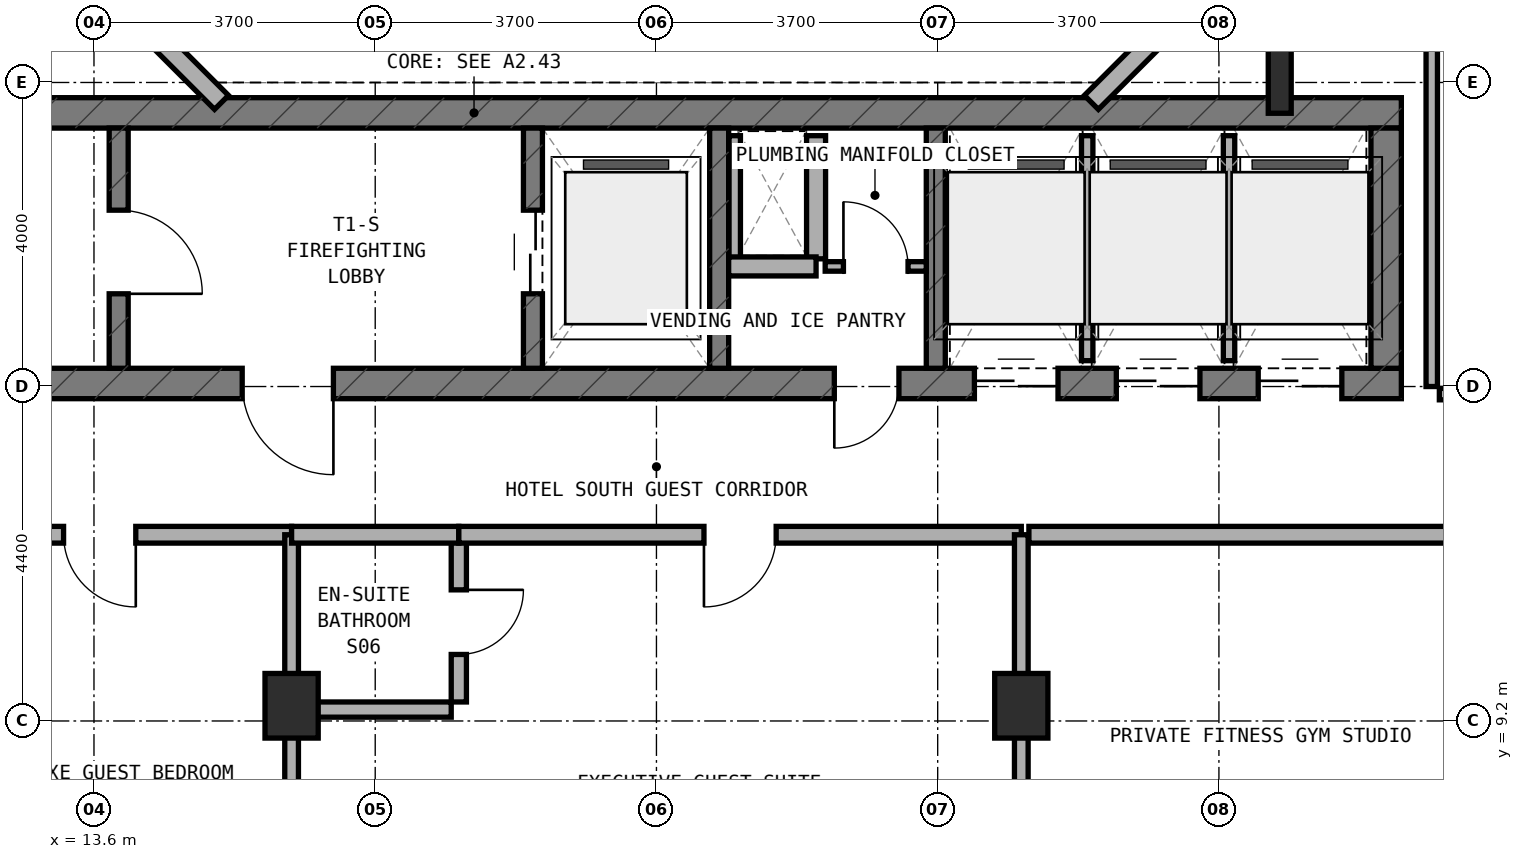
"""IFC4 building model, lengths in metres.
Left out: names, types, materials, properties, quantities, classifications, styles, units other than length and angle.
Written with IfcOpenShell. Run it as: python <this file> out.ifc"""

import sys

from ifc_helpers import new_model, si_unit, direction, frame, frame_2d, origin, origin_2d, place, context, subcontext, project, spatial, rectangle, i_section, extrude, element, fill, save


model = new_model("IFC4")
c1 = context("Model", 3, precision=1e-05, world=origin(), true_north=direction((0.0, 1.0)))
c2 = subcontext(c1, "Body", "Model", "MODEL_VIEW")
j1 = project(units=[si_unit("LENGTHUNIT", "METRE"), si_unit("PLANEANGLEUNIT", "RADIAN")], contexts=[c1])
p1 = place(None, origin())
s1 = spatial("IfcSite", under=j1, at=p1, CompositionType="ELEMENT")
p2 = place(p1, origin())
s2 = spatial("IfcBuilding", under=s1, at=p2, CompositionType="ELEMENT")
p3 = place(p2, frame((0.0, 0.0, 199.1)))
s3 = spatial("IfcBuildingStorey", under=s2, at=p3, CompositionType="ELEMENT", Elevation=199.1)
p4 = place(p3, frame((6.4, 13.64, 0.0), z_axis=(0.0, 0.0, 1.0), x_axis=(1.0, 0.0, 0.0)))
e1 = element("IfcWall", 1, at=p4, inside=s3, PredefinedType="SHEAR", context=c2, shape_type="SweptSolid", body=[
    extrude(rectangle(XDim=24.4, YDim=0.4, at=frame_2d((12.2, 0.0))), origin(), (0.0, 0.0, 1.0), 3.6),
])
p5 = place(p4, frame((9.15, 0.0, 0.0)))
e2 = element("IfcOpeningElement", 2, at=p5, cuts=e1, PredefinedType="OPENING", context=c2, shape_type="SweptSolid", body=[
    extrude(rectangle(XDim=1.2, YDim=2.15, at=frame_2d((0.6, 1.075))), frame((0.0, 0.21, 0.0), z_axis=(0.0, -1.0, 0.0), x_axis=(1.0, 0.0, 0.0)), (0.0, 0.0, 1.0), 0.42),
])
p6 = place(p4, frame((16.94, 0.0, 0.0)))
e3 = element("IfcOpeningElement", 3, at=p6, cuts=e1, PredefinedType="OPENING", context=c2, shape_type="SweptSolid", body=[
    extrude(rectangle(XDim=0.85, YDim=2.1, at=frame_2d((0.425, 1.05))), frame((0.0, 0.21, 0.0), z_axis=(0.0, -1.0, 0.0), x_axis=(1.0, 0.0, 0.0)), (0.0, 0.0, 1.0), 0.42),
])
p7 = place(p4, frame((18.783, 0.0, 0.0)))
e4 = element("IfcOpeningElement", 4, at=p7, cuts=e1, PredefinedType="OPENING", context=c2, shape_type="SweptSolid", body=[
    extrude(rectangle(XDim=1.1, YDim=2.15, at=frame_2d((0.55, 1.075))), frame((0.0, 0.21, 0.0), z_axis=(0.0, -1.0, 0.0), x_axis=(1.0, 0.0, 0.0)), (0.0, 0.0, 1.0), 0.42),
])
p8 = place(p4, frame((20.65, 0.0, 0.0)))
e5 = element("IfcOpeningElement", 5, at=p8, cuts=e1, PredefinedType="OPENING", context=c2, shape_type="SweptSolid", body=[
    extrude(rectangle(XDim=1.1, YDim=2.15, at=frame_2d((0.55, 1.075))), frame((0.0, 0.21, 0.0), z_axis=(0.0, -1.0, 0.0), x_axis=(1.0, 0.0, 0.0)), (0.0, 0.0, 1.0), 0.42),
])
p9 = place(p4, frame((22.517, 0.0, 0.0)))
e6 = element("IfcOpeningElement", 6, at=p9, cuts=e1, PredefinedType="OPENING", context=c2, shape_type="SweptSolid", body=[
    extrude(rectangle(XDim=1.1, YDim=2.15, at=frame_2d((0.55, 1.075))), frame((0.0, 0.21, 0.0), z_axis=(0.0, -1.0, 0.0), x_axis=(1.0, 0.0, 0.0)), (0.0, 0.0, 1.0), 0.42),
])
p10 = place(p3, frame((6.4, 17.2, 0.0), z_axis=(0.0, 0.0, 1.0), x_axis=(1.0, 0.0, 0.0)))
e7 = element("IfcWall", 7, at=p10, inside=s3, PredefinedType="SHEAR", context=c2, shape_type="SweptSolid", body=[
    extrude(rectangle(XDim=24.4, YDim=0.4, at=frame_2d((12.2, 0.0))), origin(), (0.0, 0.0, 1.0), 3.6),
])
p11 = place(p3, frame((30.6, 13.84, 0.0), z_axis=(0.0, 0.0, 1.0), x_axis=(0.0, 1.0, 0.0)))
e8 = element("IfcWall", 8, at=p11, inside=s3, PredefinedType="SHEAR", context=c2, shape_type="SweptSolid", body=[
    extrude(rectangle(XDim=3.16, YDim=0.4, at=frame_2d((1.58, 0.0))), origin(), (0.0, 0.0, 1.0), 3.6),
])
p12 = place(p3, frame((13.925, 13.84, 0.0), z_axis=(0.0, 0.0, 1.0), x_axis=(0.0, 1.0, 0.0)))
e9 = element("IfcWall", 9, at=p12, inside=s3, PredefinedType="STANDARD", context=c2, shape_type="SweptSolid", body=[
    extrude(rectangle(XDim=3.16, YDim=0.25, at=frame_2d((1.58, 0.0))), origin(), (0.0, 0.0, 1.0), 3.32),
])
p13 = place(p12, frame((0.98, 0.0, 0.0)))
e10 = element("IfcOpeningElement", 10, at=p13, cuts=e9, PredefinedType="OPENING", context=c2, shape_type="SweptSolid", body=[
    extrude(rectangle(XDim=1.1, YDim=2.15, at=frame_2d((0.55, 1.075))), frame((0.0, 0.135, 0.0), z_axis=(0.0, -1.0, 0.0), x_axis=(1.0, 0.0, 0.0)), (0.0, 0.0, 1.0), 0.27),
])
p14 = place(p3, frame((19.375, 13.84, 0.0), z_axis=(0.0, 0.0, 1.0), x_axis=(0.0, 1.0, 0.0)))
e11 = element("IfcWall", 11, at=p14, inside=s3, PredefinedType="STANDARD", context=c2, shape_type="SweptSolid", body=[
    extrude(rectangle(XDim=3.16, YDim=0.25, at=frame_2d((1.58, 0.0))), origin(), (0.0, 0.0, 1.0), 3.32),
])
p15 = place(p14, frame((0.98, 0.0, 0.0)))
e12 = element("IfcOpeningElement", 12, at=p15, cuts=e11, PredefinedType="OPENING", context=c2, shape_type="SweptSolid", body=[
    extrude(rectangle(XDim=1.1, YDim=2.15, at=frame_2d((0.55, 1.075))), frame((0.0, 0.135, 0.0), z_axis=(0.0, -1.0, 0.0), x_axis=(1.0, 0.0, 0.0)), (0.0, 0.0, 1.0), 0.27),
])
for number, where, z_axis, x_axis in (
    (13, (21.825, 13.84, 0.0), (0.0, 0.0, 1.0), (0.0, 1.0, 0.0)),
    (14, (24.675, 13.84, 0.0), (0.0, 0.0, 1.0), (0.0, 1.0, 0.0)),
):
    element("IfcWall", number, at=place(p3, frame(where, z_axis=z_axis, x_axis=x_axis)), inside=s3, PredefinedType="STANDARD", context=c2, shape_type="SweptSolid", body=[
        extrude(rectangle(XDim=3.16, YDim=0.25, at=frame_2d((1.58, 0.0))), origin(), (0.0, 0.0, 1.0), 3.32),
    ])
for number, where, z_axis, x_axis in (
    (15, (16.2, 9.4, 0.0), (0.0, 0.0, 1.0), (1.0, 0.0, 0.0)),
    (16, (25.8, 9.4, 0.0), (0.0, 0.0, 1.0), (1.0, 0.0, 0.0)),
):
    element("IfcColumn", number, at=place(p3, frame(where, z_axis=z_axis, x_axis=x_axis)), inside=s3, PredefinedType="COLUMN", context=c2, shape_type="SweptSolid", body=[
        extrude(rectangle(XDim=0.7, YDim=0.85, at=origin_2d()), origin(), (0.0, 0.0, 1.0), 3.6),
    ])
p16 = place(p3, frame((29.2, 17.65, 0.0), z_axis=(0.0, 0.0, 1.0), x_axis=(1.0, 0.0, 0.0)))
e17 = element("IfcColumn", 17, at=p16, inside=s3, PredefinedType="COLUMN", context=c2, shape_type="SweptSolid", body=[
    extrude(i_section(OverallWidth=0.302, OverallDepth=0.91, WebThickness=0.021, FlangeThickness=0.04, FilletRadius=0.03, at=origin_2d()), origin(), (0.0, 0.0, 1.0), 3.6),
])
for number, where, z_axis, x_axis in (
    (18, (26.722, 17.338, 0.0), (0.0, 0.0, 1.0), (0.707, 0.707, 0.0)),
    (19, (13.444, 19.172, 0.0), (0.0, 0.0, 1.0), (0.707, -0.707, 0.0)),
):
    element("IfcWall", number, at=place(p3, frame(where, z_axis=z_axis, x_axis=x_axis)), inside=s3, PredefinedType="STANDARD", context=c2, shape_type="SweptSolid", body=[
        extrude(rectangle(XDim=2.594, YDim=0.26, at=frame_2d((1.297, 0.0))), origin(), (0.0, 0.0, 1.0), 3.32),
    ])
p17 = place(p3, frame((22.03, 15.28, 0.0), z_axis=(0.0, 0.0, 1.0), x_axis=(0.0, 1.0, 0.0)))
e20 = element("IfcWall", 20, at=p17, inside=s3, PredefinedType="PARTITIONING", context=c2, shape_type="SweptSolid", body=[
    extrude(rectangle(XDim=1.62, YDim=0.15, at=frame_2d((0.81, 0.0))), origin(), (0.0, 0.0, 1.0), 3.32),
])
p18 = place(p3, frame((23.1, 15.28, 0.0), z_axis=(0.0, 0.0, 1.0), x_axis=(0.0, 1.0, 0.0)))
e21 = element("IfcWall", 21, at=p18, inside=s3, PredefinedType="SOLIDWALL", context=c2, shape_type="SweptSolid", body=[
    extrude(rectangle(XDim=1.62, YDim=0.25, at=frame_2d((0.81, 0.0))), origin(), (0.0, 0.0, 1.0), 3.32),
])
p19 = place(p3, frame((21.95, 15.18, 0.0), z_axis=(0.0, 0.0, 1.0), x_axis=(1.0, 0.0, 0.0)))
e22 = element("IfcWall", 22, at=p19, inside=s3, PredefinedType="SOLIDWALL", context=c2, shape_type="SweptSolid", body=[
    extrude(rectangle(XDim=1.15, YDim=0.25, at=frame_2d((0.575, 0.0))), origin(), (0.0, 0.0, 1.0), 3.32),
])
p20 = place(p3, frame((23.22, 15.18, 0.0), z_axis=(0.0, 0.0, 1.0), x_axis=(1.0, 0.0, 0.0)))
e23 = element("IfcWall", 23, at=p20, inside=s3, PredefinedType="PARTITIONING", context=c2, shape_type="SweptSolid", body=[
    extrude(rectangle(XDim=1.33, YDim=0.125, at=frame_2d((0.665, 0.0))), origin(), (0.0, 0.0, 1.0), 3.32),
])
p21 = place(p20, frame((0.24, 0.0, 0.0)))
e24 = element("IfcOpeningElement", 24, at=p21, cuts=e23, PredefinedType="OPENING", context=c2, shape_type="SweptSolid", body=[
    extrude(rectangle(XDim=0.85, YDim=2.1, at=frame_2d((0.425, 1.05))), frame((0.0, 0.073, 0.0), z_axis=(0.0, -1.0, 0.0), x_axis=(1.0, 0.0, 0.0)), (0.0, 0.0, 1.0), 0.145),
])
p22 = place(p3, frame((26.667, 13.94, 0.0), z_axis=(0.0, 0.0, 1.0), x_axis=(0.0, 1.0, 0.0)))
e25 = element("IfcWall", 25, at=p22, inside=s3, PredefinedType="PARTITIONING", context=c2, shape_type="SweptSolid", body=[
    extrude(rectangle(XDim=2.96, YDim=0.15, at=frame_2d((1.48, 0.0))), origin(), (0.0, 0.0, 1.0), 3.32),
])
p23 = place(p3, frame((28.533, 13.94, 0.0), z_axis=(0.0, 0.0, 1.0), x_axis=(0.0, 1.0, 0.0)))
e26 = element("IfcWall", 26, at=p23, inside=s3, PredefinedType="PARTITIONING", context=c2, shape_type="SweptSolid", body=[
    extrude(rectangle(XDim=2.96, YDim=0.15, at=frame_2d((1.48, 0.0))), origin(), (0.0, 0.0, 1.0), 2.695),
])
p24 = place(p3, frame((11.15, 11.65, 0.0), z_axis=(0.0, 0.0, 1.0), x_axis=(1.0, 0.0, 0.0)))
e27 = element("IfcWall", 27, at=p24, inside=s3, PredefinedType="SOLIDWALL", context=c2, shape_type="SweptSolid", body=[
    extrude(rectangle(XDim=5.05, YDim=0.22, at=frame_2d((2.525, 0.0))), origin(), (0.0, 0.0, 1.0), 2.695),
])
p25 = place(p24, frame((2.05, 0.0, 0.0)))
e28 = element("IfcOpeningElement", 28, at=p25, cuts=e27, PredefinedType="OPENING", context=c2, shape_type="SweptSolid", body=[
    extrude(rectangle(XDim=0.95, YDim=2.1, at=frame_2d((0.475, 1.05))), frame((0.0, 0.12, 0.0), z_axis=(0.0, -1.0, 0.0), x_axis=(1.0, 0.0, 0.0)), (0.0, 0.0, 1.0), 0.24),
])
p26 = place(p3, frame((16.2, 5.86, 0.0), z_axis=(0.0, 0.0, 1.0), x_axis=(0.0, 1.0, 0.0)))
e29 = element("IfcWall", 29, at=p26, inside=s3, PredefinedType="SOLIDWALL", context=c2, shape_type="SweptSolid", body=[
    extrude(rectangle(XDim=5.79, YDim=0.18, at=frame_2d((2.895, 0.0))), origin(), (0.0, 0.0, 1.0), 2.695),
])
p27 = place(p3, frame((18.4, 9.45, 0.0), z_axis=(0.0, 0.0, 1.0), x_axis=(0.0, 1.0, 0.0)))
e30 = element("IfcWall", 30, at=p27, inside=s3, PredefinedType="PLUMBINGWALL", context=c2, shape_type="SweptSolid", body=[
    extrude(rectangle(XDim=2.1, YDim=0.2, at=frame_2d((1.05, 0.0))), origin(), (0.0, 0.0, 1.0), 3.015),
])
p28 = place(p27, frame((0.625, 0.0, 0.0)))
e31 = element("IfcOpeningElement", 31, at=p28, cuts=e30, PredefinedType="OPENING", context=c2, shape_type="SweptSolid", body=[
    extrude(rectangle(XDim=0.85, YDim=2.1, at=frame_2d((0.425, 1.05))), frame((0.0, 0.11, 0.0), z_axis=(0.0, -1.0, 0.0), x_axis=(1.0, 0.0, 0.0)), (0.0, 0.0, 1.0), 0.22),
])
p29 = place(p3, frame((16.3, 9.35, 0.0), z_axis=(0.0, 0.0, 1.0), x_axis=(1.0, 0.0, 0.0)))
e32 = element("IfcWall", 32, at=p29, inside=s3, PredefinedType="PLUMBINGWALL", context=c2, shape_type="SweptSolid", body=[
    extrude(rectangle(XDim=2.0, YDim=0.2, at=frame_2d((1.0, 0.0))), origin(), (0.0, 0.0, 1.0), 3.015),
])
p30 = place(p3, frame((16.2, 11.65, 0.0), z_axis=(0.0, 0.0, 1.0), x_axis=(1.0, 0.0, 0.0)))
e33 = element("IfcWall", 33, at=p30, inside=s3, PredefinedType="SOLIDWALL", context=c2, shape_type="SweptSolid", body=[
    extrude(rectangle(XDim=2.2, YDim=0.22, at=frame_2d((1.1, 0.0))), origin(), (0.0, 0.0, 1.0), 2.695),
])
p31 = place(p3, frame((18.4, 11.65, 0.0), z_axis=(0.0, 0.0, 1.0), x_axis=(1.0, 0.0, 0.0)))
e34 = element("IfcWall", 34, at=p31, inside=s3, PredefinedType="SOLIDWALL", context=c2, shape_type="SweptSolid", body=[
    extrude(rectangle(XDim=7.4, YDim=0.22, at=frame_2d((3.7, 0.0))), origin(), (0.0, 0.0, 1.0), 2.695),
])
p32 = place(p31, frame((3.225, 0.0, 0.0)))
e35 = element("IfcOpeningElement", 35, at=p32, cuts=e34, PredefinedType="OPENING", context=c2, shape_type="SweptSolid", body=[
    extrude(rectangle(XDim=0.95, YDim=2.1, at=frame_2d((0.475, 1.05))), frame((0.0, 0.12, 0.0), z_axis=(0.0, -1.0, 0.0), x_axis=(1.0, 0.0, 0.0)), (0.0, 0.0, 1.0), 0.24),
])
p33 = place(p3, frame((25.8, 5.86, 0.0), z_axis=(0.0, 0.0, 1.0), x_axis=(0.0, 1.0, 0.0)))
e36 = element("IfcWall", 36, at=p33, inside=s3, PredefinedType="SOLIDWALL", context=c2, shape_type="SweptSolid", body=[
    extrude(rectangle(XDim=5.79, YDim=0.18, at=frame_2d((2.895, 0.0))), origin(), (0.0, 0.0, 1.0), 2.695),
])
p34 = place(p3, frame((25.9, 11.65, 0.0), z_axis=(0.0, 0.0, 1.0), x_axis=(1.0, 0.0, 0.0)))
e37 = element("IfcWall", 37, at=p34, inside=s3, PredefinedType="SOLIDWALL", context=c2, shape_type="SweptSolid", body=[
    extrude(rectangle(XDim=14.04, YDim=0.22, at=frame_2d((7.02, 0.0))), origin(), (0.0, 0.0, 1.0), 2.695),
])
p35 = place(p34, frame((5.881, 0.0, 0.0)))
e38 = element("IfcOpeningElement", 38, at=p35, cuts=e37, PredefinedType="OPENING", context=c2, shape_type="SweptSolid", body=[
    extrude(rectangle(XDim=0.95, YDim=2.1, at=frame_2d((0.475, 1.05))), frame((0.0, 0.12, 0.0), z_axis=(0.0, -1.0, 0.0), x_axis=(1.0, 0.0, 0.0)), (0.0, 0.0, 1.0), 0.24),
])
p36 = place(p3, frame((31.2, 13.6, 0.0), z_axis=(0.0, 0.0, 1.0), x_axis=(0.0, 1.0, 0.0)))
e39 = element("IfcWall", 39, at=p36, inside=s3, PredefinedType="PARTITIONING", context=c2, shape_type="SweptSolid", body=[
    extrude(rectangle(XDim=22.86, YDim=0.15, at=frame_2d((11.43, 0.0))), origin(), (0.0, 0.0, 1.0), 2.695),
])
p37 = place(p3, frame((31.3, 13.5, 0.0), z_axis=(0.0, 0.0, 1.0), x_axis=(1.0, 0.0, 0.0)))
e40 = element("IfcWall", 40, at=p37, inside=s3, PredefinedType="PARTITIONING", context=c2, shape_type="SweptSolid", body=[
    extrude(rectangle(XDim=3.95, YDim=0.15, at=frame_2d((1.975, 0.0))), origin(), (0.0, 0.0, 1.0), 3.015),
])
p38 = place(p13, frame((1.1, 0.0, 0.0), z_axis=(0.0, 0.0, 1.0), x_axis=(-1.0, 0.0, 0.0)))
e41 = element("IfcDoor", 41, at=p38, inside=s3, OperationType="SINGLE_SWING_RIGHT", PredefinedType="DOOR", context=c2, shape_type="SweptSolid", body=[
    extrude(rectangle(XDim=1.1, YDim=2.15, at=frame_2d((0.55, 1.075))), frame((0.0, 0.025, 0.0), z_axis=(0.0, -1.0, 0.0), x_axis=(1.0, 0.0, 0.0)), (0.0, 0.0, 1.0), 0.05),
])
fill(e10, e41)
p39 = place(p5, frame((1.2, 0.0, 0.0), z_axis=(0.0, 0.0, 1.0), x_axis=(-1.0, 0.0, 0.0)))
e42 = element("IfcDoor", 42, at=p39, inside=s3, OperationType="SINGLE_SWING_LEFT", PredefinedType="DOOR", context=c2, shape_type="SweptSolid", body=[
    extrude(rectangle(XDim=1.2, YDim=2.15, at=frame_2d((0.6, 1.075))), frame((0.0, 0.025, 0.0), z_axis=(0.0, -1.0, 0.0), x_axis=(1.0, 0.0, 0.0)), (0.0, 0.0, 1.0), 0.05),
])
fill(e2, e42)
p40 = place(p15, origin())
e43 = element("IfcDoor", 43, at=p40, inside=s3, OperationType="DOUBLE_DOOR_SLIDING", PredefinedType="DOOR", context=c2, shape_type="SweptSolid", body=[
    extrude(rectangle(XDim=1.1, YDim=2.15, at=frame_2d((0.55, 1.075))), frame((0.0, 0.025, 0.0), z_axis=(0.0, -1.0, 0.0), x_axis=(1.0, 0.0, 0.0)), (0.0, 0.0, 1.0), 0.05),
])
fill(e12, e43)
p41 = place(p6, frame((0.85, 0.0, 0.0), z_axis=(0.0, 0.0, 1.0), x_axis=(-1.0, 0.0, 0.0)))
e44 = element("IfcDoor", 44, at=p41, inside=s3, OperationType="SINGLE_SWING_RIGHT", PredefinedType="DOOR", context=c2, shape_type="SweptSolid", body=[
    extrude(rectangle(XDim=0.85, YDim=2.1, at=frame_2d((0.425, 1.05))), frame((0.0, 0.025, 0.0), z_axis=(0.0, -1.0, 0.0), x_axis=(1.0, 0.0, 0.0)), (0.0, 0.0, 1.0), 0.05),
])
fill(e3, e44)
p42 = place(p7, frame((1.1, 0.0, 0.0), z_axis=(0.0, 0.0, 1.0), x_axis=(-1.0, 0.0, 0.0)))
e45 = element("IfcDoor", 45, at=p42, inside=s3, OperationType="DOUBLE_DOOR_SLIDING", PredefinedType="DOOR", context=c2, shape_type="SweptSolid", body=[
    extrude(rectangle(XDim=1.1, YDim=2.15, at=frame_2d((0.55, 1.075))), frame((0.0, 0.025, 0.0), z_axis=(0.0, -1.0, 0.0), x_axis=(1.0, 0.0, 0.0)), (0.0, 0.0, 1.0), 0.05),
])
fill(e4, e45)
p43 = place(p8, frame((1.1, 0.0, 0.0), z_axis=(0.0, 0.0, 1.0), x_axis=(-1.0, 0.0, 0.0)))
e46 = element("IfcDoor", 46, at=p43, inside=s3, OperationType="DOUBLE_DOOR_SLIDING", PredefinedType="DOOR", context=c2, shape_type="SweptSolid", body=[
    extrude(rectangle(XDim=1.1, YDim=2.15, at=frame_2d((0.55, 1.075))), frame((0.0, 0.025, 0.0), z_axis=(0.0, -1.0, 0.0), x_axis=(1.0, 0.0, 0.0)), (0.0, 0.0, 1.0), 0.05),
])
fill(e5, e46)
p44 = place(p9, frame((1.1, 0.0, 0.0), z_axis=(0.0, 0.0, 1.0), x_axis=(-1.0, 0.0, 0.0)))
e47 = element("IfcDoor", 47, at=p44, inside=s3, OperationType="DOUBLE_DOOR_SLIDING", PredefinedType="DOOR", context=c2, shape_type="SweptSolid", body=[
    extrude(rectangle(XDim=1.1, YDim=2.15, at=frame_2d((0.55, 1.075))), frame((0.0, 0.025, 0.0), z_axis=(0.0, -1.0, 0.0), x_axis=(1.0, 0.0, 0.0)), (0.0, 0.0, 1.0), 0.05),
])
fill(e6, e47)
p45 = place(p21, origin())
e48 = element("IfcDoor", 48, at=p45, inside=s3, OperationType="SINGLE_SWING_LEFT", PredefinedType="DOOR", context=c2, shape_type="SweptSolid", body=[
    extrude(rectangle(XDim=0.85, YDim=2.1, at=frame_2d((0.425, 1.05))), frame((0.0, 0.025, 0.0), z_axis=(0.0, -1.0, 0.0), x_axis=(1.0, 0.0, 0.0)), (0.0, 0.0, 1.0), 0.05),
])
fill(e24, e48)
p46 = place(p25, frame((0.95, 0.0, 0.0), z_axis=(0.0, 0.0, 1.0), x_axis=(-1.0, 0.0, 0.0)))
e49 = element("IfcDoor", 49, at=p46, inside=s3, OperationType="SINGLE_SWING_LEFT", PredefinedType="DOOR", context=c2, shape_type="SweptSolid", body=[
    extrude(rectangle(XDim=0.95, YDim=2.1, at=frame_2d((0.475, 1.05))), frame((0.0, 0.025, 0.0), z_axis=(0.0, -1.0, 0.0), x_axis=(1.0, 0.0, 0.0)), (0.0, 0.0, 1.0), 0.05),
])
fill(e28, e49)
p47 = place(p28, frame((0.85, 0.0, 0.0), z_axis=(0.0, 0.0, 1.0), x_axis=(-1.0, 0.0, 0.0)))
e50 = element("IfcDoor", 50, at=p47, inside=s3, OperationType="SINGLE_SWING_LEFT", PredefinedType="DOOR", context=c2, shape_type="SweptSolid", body=[
    extrude(rectangle(XDim=0.85, YDim=2.1, at=frame_2d((0.425, 1.05))), frame((0.0, 0.025, 0.0), z_axis=(0.0, -1.0, 0.0), x_axis=(1.0, 0.0, 0.0)), (0.0, 0.0, 1.0), 0.05),
])
fill(e31, e50)
p48 = place(p32, frame((0.95, 0.0, 0.0), z_axis=(0.0, 0.0, 1.0), x_axis=(-1.0, 0.0, 0.0)))
e51 = element("IfcDoor", 51, at=p48, inside=s3, OperationType="SINGLE_SWING_RIGHT", PredefinedType="DOOR", context=c2, shape_type="SweptSolid", body=[
    extrude(rectangle(XDim=0.95, YDim=2.1, at=frame_2d((0.475, 1.05))), frame((0.0, 0.025, 0.0), z_axis=(0.0, -1.0, 0.0), x_axis=(1.0, 0.0, 0.0)), (0.0, 0.0, 1.0), 0.05),
])
fill(e35, e51)
save(model, sys.argv[1])
